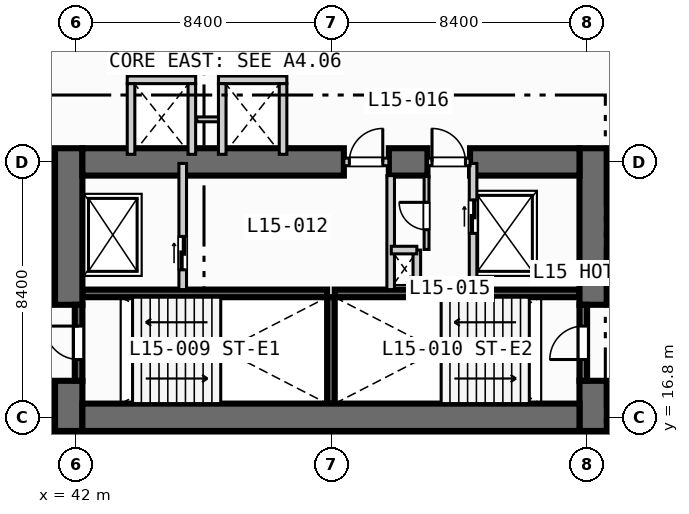
"""IFC4 building model, lengths in metres.
Left out: names, types, materials, properties, quantities, classifications, styles, units other than length and angle.
Written with IfcOpenShell. Run it as: python <this file> out.ifc"""

import sys

from ifc_helpers import new_model, si_unit, direction, frame, frame_2d, origin, place, context, subcontext, project, spatial, rectangle, extrude, element, fill, save


model = new_model("IFC4")
c1 = context("Model", 3, precision=1e-05, world=origin(), true_north=direction((0.0, 1.0)))
c2 = subcontext(c1, "Body", "Model", "MODEL_VIEW")
j1 = project(units=[si_unit("LENGTHUNIT", "METRE"), si_unit("PLANEANGLEUNIT", "RADIAN")], contexts=[c1])
p1 = place(None, origin())
s1 = spatial("IfcSite", under=j1, at=p1, CompositionType="ELEMENT")
p2 = place(p1, origin())
s2 = spatial("IfcBuilding", under=s1, at=p2, CompositionType="ELEMENT")
p3 = place(p2, frame((0.0, 0.0, 66.2)))
s3 = spatial("IfcBuildingStorey", under=s2, at=p3, CompositionType="ELEMENT", Elevation=66.2)
for number, where, z_axis, x_axis in (
    (1, (42.2, 20.875, 0.0), (0.0, 0.0, 1.0), (1.0, 0.0, 0.0)),
    (2, (50.5, 20.875, 0.0), (0.0, 0.0, 1.0), (1.0, 0.0, 0.0)),
):
    element("IfcWall", number, at=place(p3, frame(where, z_axis=z_axis, x_axis=x_axis)), inside=s3, PredefinedType="SOLIDWALL", context=c2, shape_type="SweptSolid", body=[
        extrude(rectangle(XDim=8.05, YDim=0.25, at=frame_2d((4.025, 0.0))), origin(), (0.0, 0.0, 1.0), 3.55),
    ])
p4 = place(p3, frame((50.375, 17.25, 0.0), z_axis=(0.0, 0.0, 1.0), x_axis=(0.0, 1.0, 0.0)))
e3 = element("IfcWall", 3, at=p4, inside=s3, PredefinedType="SOLIDWALL", context=c2, shape_type="SweptSolid", body=[
    extrude(rectangle(XDim=3.5, YDim=0.25, at=frame_2d((1.75, 0.0))), origin(), (0.0, 0.0, 1.0), 3.55),
])
p5 = place(p3, frame((41.75, 16.35, 0.0), z_axis=(0.0, 0.0, 1.0), x_axis=(0.0, 1.0, 0.0)))
e4 = element("IfcWall", 4, at=p5, inside=s3, PredefinedType="SHEAR", context=c2, shape_type="SweptSolid", body=[
    extrude(rectangle(XDim=1.65, YDim=0.9, at=frame_2d((0.825, 0.0))), origin(), (0.0, 0.0, 1.0), 3.55),
])
p6 = place(p3, frame((41.75, 20.5, 0.0), z_axis=(0.0, 0.0, 1.0), x_axis=(0.0, 1.0, 0.0)))
e5 = element("IfcWall", 5, at=p6, inside=s3, PredefinedType="SHEAR", context=c2, shape_type="SweptSolid", body=[
    extrude(rectangle(XDim=5.15, YDim=0.9, at=frame_2d((2.575, 0.0))), origin(), (0.0, 0.0, 1.0), 3.55),
])
p7 = place(p3, frame((59.0, 16.35, 0.0), z_axis=(0.0, 0.0, 1.0), x_axis=(0.0, 1.0, 0.0)))
e6 = element("IfcWall", 6, at=p7, inside=s3, PredefinedType="SHEAR", context=c2, shape_type="SweptSolid", body=[
    extrude(rectangle(XDim=1.65, YDim=0.9, at=frame_2d((0.825, 0.0))), origin(), (0.0, 0.0, 1.0), 3.55),
])
p8 = place(p3, frame((59.0, 20.5, 0.0), z_axis=(0.0, 0.0, 1.0), x_axis=(0.0, 1.0, 0.0)))
e7 = element("IfcWall", 7, at=p8, inside=s3, PredefinedType="SHEAR", context=c2, shape_type="SweptSolid", body=[
    extrude(rectangle(XDim=5.15, YDim=0.9, at=frame_2d((2.575, 0.0))), origin(), (0.0, 0.0, 1.0), 3.55),
])
p9 = place(p3, frame((42.2, 16.8, 0.0), z_axis=(0.0, 0.0, 1.0), x_axis=(1.0, 0.0, 0.0)))
e8 = element("IfcWall", 8, at=p9, inside=s3, PredefinedType="SHEAR", context=c2, shape_type="SweptSolid", body=[
    extrude(rectangle(XDim=16.35, YDim=0.9, at=frame_2d((8.175, 0.0))), origin(), (0.0, 0.0, 1.0), 3.55),
])
p10 = place(p3, frame((42.2, 25.2, 0.0), z_axis=(0.0, 0.0, 1.0), x_axis=(1.0, 0.0, 0.0)))
e9 = element("IfcWall", 9, at=p10, inside=s3, PredefinedType="SHEAR", context=c2, shape_type="SweptSolid", body=[
    extrude(rectangle(XDim=8.6, YDim=0.9, at=frame_2d((4.3, 0.0))), origin(), (0.0, 0.0, 1.0), 3.55),
])
p11 = place(p3, frame((52.28, 25.2, 0.0), z_axis=(0.0, 0.0, 1.0), x_axis=(1.0, 0.0, 0.0)))
e10 = element("IfcWall", 10, at=p11, inside=s3, PredefinedType="SHEAR", context=c2, shape_type="SweptSolid", body=[
    extrude(rectangle(XDim=1.27, YDim=0.9, at=frame_2d((0.635, 0.0))), origin(), (0.0, 0.0, 1.0), 3.55),
])
p12 = place(p3, frame((54.95, 25.2, 0.0), z_axis=(0.0, 0.0, 1.0), x_axis=(1.0, 0.0, 0.0)))
e11 = element("IfcWall", 11, at=p12, inside=s3, PredefinedType="SHEAR", context=c2, shape_type="SweptSolid", body=[
    extrude(rectangle(XDim=3.6, YDim=0.9, at=frame_2d((1.8, 0.0))), origin(), (0.0, 0.0, 1.0), 3.55),
])
p13 = place(p3, frame((42.075, 18.0, 0.0), z_axis=(0.0, 0.0, 1.0), x_axis=(0.0, 1.0, 0.0)))
e12 = element("IfcWall", 12, at=p13, inside=s3, PredefinedType="SOLIDWALL", context=c2, shape_type="SweptSolid", body=[
    extrude(rectangle(XDim=2.5, YDim=0.25, at=frame_2d((1.25, 0.0))), origin(), (0.0, 0.0, 1.0), 3.55),
])
p14 = place(p13, frame((0.7, 0.0, 0.0)))
e13 = element("IfcOpeningElement", 13, at=p14, cuts=e12, PredefinedType="OPENING", context=c2, shape_type="SweptSolid", body=[
    extrude(rectangle(XDim=1.1, YDim=2.15, at=frame_2d((0.55, 1.075))), frame((0.0, 0.135, 0.0), z_axis=(0.0, -1.0, 0.0), x_axis=(1.0, 0.0, 0.0)), (0.0, 0.0, 1.0), 0.27),
])
p15 = place(p3, frame((58.675, 18.0, 0.0), z_axis=(0.0, 0.0, 1.0), x_axis=(0.0, 1.0, 0.0)))
e14 = element("IfcWall", 14, at=p15, inside=s3, PredefinedType="SOLIDWALL", context=c2, shape_type="SweptSolid", body=[
    extrude(rectangle(XDim=2.5, YDim=0.25, at=frame_2d((1.25, 0.0))), origin(), (0.0, 0.0, 1.0), 3.55),
])
p16 = place(p15, frame((0.7, 0.0, 0.0)))
e15 = element("IfcOpeningElement", 15, at=p16, cuts=e14, PredefinedType="OPENING", context=c2, shape_type="SweptSolid", body=[
    extrude(rectangle(XDim=1.1, YDim=2.15, at=frame_2d((0.55, 1.075))), frame((0.0, 0.135, 0.0), z_axis=(0.0, -1.0, 0.0), x_axis=(1.0, 0.0, 0.0)), (0.0, 0.0, 1.0), 0.27),
])
p17 = place(p3, frame((45.5, 21.0, 0.0), z_axis=(0.0, 0.0, 1.0), x_axis=(0.0, 1.0, 0.0)))
e16 = element("IfcWall", 16, at=p17, inside=s3, PredefinedType="SOLIDWALL", context=c2, shape_type="SweptSolid", body=[
    extrude(rectangle(XDim=4.15, YDim=0.25, at=frame_2d((2.075, 0.0))), origin(), (0.0, 0.0, 1.0), 3.55),
])
p18 = place(p17, frame((0.65, 0.0, 0.0)))
e17 = element("IfcOpeningElement", 17, at=p18, cuts=e16, PredefinedType="OPENING", context=c2, shape_type="SweptSolid", body=[
    extrude(rectangle(XDim=1.1, YDim=2.15, at=frame_2d((0.55, 1.075))), frame((0.0, 0.135, 0.0), z_axis=(0.0, -1.0, 0.0), x_axis=(1.0, 0.0, 0.0)), (0.0, 0.0, 1.0), 0.27),
])
p19 = place(p3, frame((50.8, 25.2, 0.0), z_axis=(0.0, 0.0, 1.0), x_axis=(1.0, 0.0, 0.0)))
e18 = element("IfcWall", 18, at=p19, inside=s3, PredefinedType="SOLIDWALL", context=c2, shape_type="SweptSolid", body=[
    extrude(rectangle(XDim=1.48, YDim=0.25, at=frame_2d((0.74, 0.0))), origin(), (0.0, 0.0, 1.0), 3.55),
])
p20 = place(p19, frame((0.18, 0.0, 0.0)))
e19 = element("IfcOpeningElement", 19, at=p20, cuts=e18, PredefinedType="OPENING", context=c2, shape_type="SweptSolid", body=[
    extrude(rectangle(XDim=1.1, YDim=2.15, at=frame_2d((0.55, 1.075))), frame((0.0, 0.135, 0.0), z_axis=(0.0, -1.0, 0.0), x_axis=(1.0, 0.0, 0.0)), (0.0, 0.0, 1.0), 0.27),
])
p21 = place(p3, frame((52.34, 21.0, 0.0), z_axis=(0.0, 0.0, 1.0), x_axis=(0.0, 1.0, 0.0)))
e20 = element("IfcWall", 20, at=p21, inside=s3, PredefinedType="SOLIDWALL", context=c2, shape_type="SweptSolid", body=[
    extrude(rectangle(XDim=3.75, YDim=0.25, at=frame_2d((1.875, 0.0))), origin(), (0.0, 0.0, 1.0), 3.55),
])
p22 = place(p3, frame((55.05, 21.0, 0.0), z_axis=(0.0, 0.0, 1.0), x_axis=(0.0, 1.0, 0.0)))
e21 = element("IfcWall", 21, at=p22, inside=s3, PredefinedType="SOLIDWALL", context=c2, shape_type="SweptSolid", body=[
    extrude(rectangle(XDim=4.15, YDim=0.25, at=frame_2d((2.075, 0.0))), origin(), (0.0, 0.0, 1.0), 3.55),
])
p23 = place(p22, frame((1.85, 0.0, 0.0)))
e22 = element("IfcOpeningElement", 22, at=p23, cuts=e21, PredefinedType="OPENING", context=c2, shape_type="SweptSolid", body=[
    extrude(rectangle(XDim=1.1, YDim=2.15, at=frame_2d((0.55, 1.075))), frame((0.0, 0.135, 0.0), z_axis=(0.0, -1.0, 0.0), x_axis=(1.0, 0.0, 0.0)), (0.0, 0.0, 1.0), 0.27),
])
p24 = place(p3, frame((53.55, 25.2, 0.0), z_axis=(0.0, 0.0, 1.0), x_axis=(1.0, 0.0, 0.0)))
e23 = element("IfcWall", 23, at=p24, inside=s3, PredefinedType="SOLIDWALL", context=c2, shape_type="SweptSolid", body=[
    extrude(rectangle(XDim=1.4, YDim=0.25, at=frame_2d((0.7, 0.0))), origin(), (0.0, 0.0, 1.0), 3.55),
])
p25 = place(p24, frame((0.15, 0.0, 0.0)))
e24 = element("IfcOpeningElement", 24, at=p25, cuts=e23, PredefinedType="OPENING", context=c2, shape_type="SweptSolid", body=[
    extrude(rectangle(XDim=1.1, YDim=2.15, at=frame_2d((0.55, 1.075))), frame((0.0, 0.135, 0.0), z_axis=(0.0, -1.0, 0.0), x_axis=(1.0, 0.0, 0.0)), (0.0, 0.0, 1.0), 0.27),
])
p26 = place(p3, frame((53.2, 21.0, 0.0), z_axis=(0.0, 0.0, 1.0), x_axis=(0.0, 1.0, 0.0)))
e25 = element("IfcWall", 25, at=p26, inside=s3, PredefinedType="SOLIDWALL", context=c2, shape_type="SweptSolid", body=[
    extrude(rectangle(XDim=1.3, YDim=0.25, at=frame_2d((0.65, 0.0))), origin(), (0.0, 0.0, 1.0), 3.55),
])
p27 = place(p3, frame((52.36, 22.3, 0.0), z_axis=(0.0, 0.0, 1.0), x_axis=(1.0, 0.0, 0.0)))
e26 = element("IfcWall", 26, at=p27, inside=s3, PredefinedType="SOLIDWALL", context=c2, shape_type="SweptSolid", body=[
    extrude(rectangle(XDim=0.84, YDim=0.25, at=frame_2d((0.42, 0.0))), origin(), (0.0, 0.0, 1.0), 3.55),
])
p28 = place(p3, frame((53.52, 22.32, 0.0), z_axis=(0.0, 0.0, 1.0), x_axis=(0.0, 1.0, 0.0)))
e27 = element("IfcWall", 27, at=p28, inside=s3, PredefinedType="PARTITIONING", context=c2, shape_type="SweptSolid", body=[
    extrude(rectangle(XDim=2.4, YDim=0.16, at=frame_2d((1.2, 0.0))), origin(), (0.0, 0.0, 1.0), 3.55),
])
p29 = place(p28, frame((0.65, 0.0, 0.0)))
e28 = element("IfcOpeningElement", 28, at=p29, cuts=e27, PredefinedType="OPENING", context=c2, shape_type="SweptSolid", body=[
    extrude(rectangle(XDim=0.9, YDim=2.1, at=frame_2d((0.45, 1.05))), frame((0.0, 0.09, 0.0), z_axis=(0.0, -1.0, 0.0), x_axis=(1.0, 0.0, 0.0)), (0.0, 0.0, 1.0), 0.18),
])
p30 = place(p3, frame((43.675, 27.9, 0.0), z_axis=(0.0, 0.0, 1.0), x_axis=(1.0, 0.0, 0.0)))
e29 = element("IfcWall", 29, at=p30, inside=s3, PredefinedType="SOLIDWALL", context=c2, shape_type="SweptSolid", body=[
    extrude(rectangle(XDim=2.25, YDim=0.25, at=frame_2d((1.125, 0.0))), origin(), (0.0, 0.0, 1.0), 3.55),
])
for number, where, z_axis, x_axis in (
    (30, (43.8, 25.45, 0.0), (0.0, 0.0, 1.0), (0.0, 1.0, 0.0)),
    (31, (45.8, 25.45, 0.0), (0.0, 0.0, 1.0), (0.0, 1.0, 0.0)),
):
    element("IfcWall", number, at=place(p3, frame(where, z_axis=z_axis, x_axis=x_axis)), inside=s3, PredefinedType="SOLIDWALL", context=c2, shape_type="SweptSolid", body=[
        extrude(rectangle(XDim=2.325, YDim=0.25, at=frame_2d((1.163, 0.0))), origin(), (0.0, 0.0, 1.0), 3.55),
    ])
p31 = place(p3, frame((45.96, 26.6, 0.0), z_axis=(0.0, 0.0, 1.0), x_axis=(1.0, 0.0, 0.0)))
e32 = element("IfcWall", 32, at=p31, inside=s3, PredefinedType="PARTITIONING", context=c2, shape_type="SweptSolid", body=[
    extrude(rectangle(XDim=0.88, YDim=0.16, at=frame_2d((0.44, 0.0))), origin(), (0.0, 0.0, 1.0), 3.55),
])
p32 = place(p3, frame((46.675, 27.9, 0.0), z_axis=(0.0, 0.0, 1.0), x_axis=(1.0, 0.0, 0.0)))
e33 = element("IfcWall", 33, at=p32, inside=s3, PredefinedType="SOLIDWALL", context=c2, shape_type="SweptSolid", body=[
    extrude(rectangle(XDim=2.25, YDim=0.25, at=frame_2d((1.125, 0.0))), origin(), (0.0, 0.0, 1.0), 3.55),
])
for number, where, z_axis, x_axis in (
    (34, (46.8, 25.45, 0.0), (0.0, 0.0, 1.0), (0.0, 1.0, 0.0)),
    (35, (48.8, 25.45, 0.0), (0.0, 0.0, 1.0), (0.0, 1.0, 0.0)),
):
    element("IfcWall", number, at=place(p3, frame(where, z_axis=z_axis, x_axis=x_axis)), inside=s3, PredefinedType="SOLIDWALL", context=c2, shape_type="SweptSolid", body=[
        extrude(rectangle(XDim=2.325, YDim=0.25, at=frame_2d((1.163, 0.0))), origin(), (0.0, 0.0, 1.0), 3.55),
    ])
p33 = place(p14, origin())
e36 = element("IfcDoor", 36, at=p33, inside=s3, OperationType="SINGLE_SWING_RIGHT", PredefinedType="DOOR", context=c2, shape_type="SweptSolid", body=[
    extrude(rectangle(XDim=1.1, YDim=2.15, at=frame_2d((0.55, 1.075))), frame((0.0, 0.025, 0.0), z_axis=(0.0, -1.0, 0.0), x_axis=(1.0, 0.0, 0.0)), (0.0, 0.0, 1.0), 0.05),
])
fill(e13, e36)
p34 = place(p16, origin())
e37 = element("IfcDoor", 37, at=p34, inside=s3, OperationType="SINGLE_SWING_LEFT", PredefinedType="DOOR", context=c2, shape_type="SweptSolid", body=[
    extrude(rectangle(XDim=1.1, YDim=2.15, at=frame_2d((0.55, 1.075))), frame((0.0, 0.025, 0.0), z_axis=(0.0, -1.0, 0.0), x_axis=(1.0, 0.0, 0.0)), (0.0, 0.0, 1.0), 0.05),
])
fill(e15, e37)
p35 = place(p18, origin())
e38 = element("IfcDoor", 38, at=p35, inside=s3, OperationType="SLIDING_TO_LEFT", PredefinedType="DOOR", context=c2, shape_type="SweptSolid", body=[
    extrude(rectangle(XDim=1.1, YDim=2.15, at=frame_2d((0.55, 1.075))), frame((0.0, 0.025, 0.0), z_axis=(0.0, -1.0, 0.0), x_axis=(1.0, 0.0, 0.0)), (0.0, 0.0, 1.0), 0.05),
])
fill(e17, e38)
p36 = place(p20, origin())
e39 = element("IfcDoor", 39, at=p36, inside=s3, OperationType="SINGLE_SWING_RIGHT", PredefinedType="DOOR", context=c2, shape_type="SweptSolid", body=[
    extrude(rectangle(XDim=1.1, YDim=2.15, at=frame_2d((0.55, 1.075))), frame((0.0, 0.025, 0.0), z_axis=(0.0, -1.0, 0.0), x_axis=(1.0, 0.0, 0.0)), (0.0, 0.0, 1.0), 0.05),
])
fill(e19, e39)
p37 = place(p23, origin())
e40 = element("IfcDoor", 40, at=p37, inside=s3, OperationType="SLIDING_TO_LEFT", PredefinedType="DOOR", context=c2, shape_type="SweptSolid", body=[
    extrude(rectangle(XDim=1.1, YDim=2.15, at=frame_2d((0.55, 1.075))), frame((0.0, 0.025, 0.0), z_axis=(0.0, -1.0, 0.0), x_axis=(1.0, 0.0, 0.0)), (0.0, 0.0, 1.0), 0.05),
])
fill(e22, e40)
p38 = place(p25, origin())
e41 = element("IfcDoor", 41, at=p38, inside=s3, OperationType="SINGLE_SWING_LEFT", PredefinedType="DOOR", context=c2, shape_type="SweptSolid", body=[
    extrude(rectangle(XDim=1.1, YDim=2.15, at=frame_2d((0.55, 1.075))), frame((0.0, 0.025, 0.0), z_axis=(0.0, -1.0, 0.0), x_axis=(1.0, 0.0, 0.0)), (0.0, 0.0, 1.0), 0.05),
])
fill(e24, e41)
p39 = place(p29, origin())
e42 = element("IfcDoor", 42, at=p39, inside=s3, OperationType="SINGLE_SWING_RIGHT", PredefinedType="DOOR", context=c2, shape_type="SweptSolid", body=[
    extrude(rectangle(XDim=0.9, YDim=2.1, at=frame_2d((0.45, 1.05))), frame((0.0, 0.025, 0.0), z_axis=(0.0, -1.0, 0.0), x_axis=(1.0, 0.0, 0.0)), (0.0, 0.0, 1.0), 0.05),
])
fill(e28, e42)
save(model, sys.argv[1])
